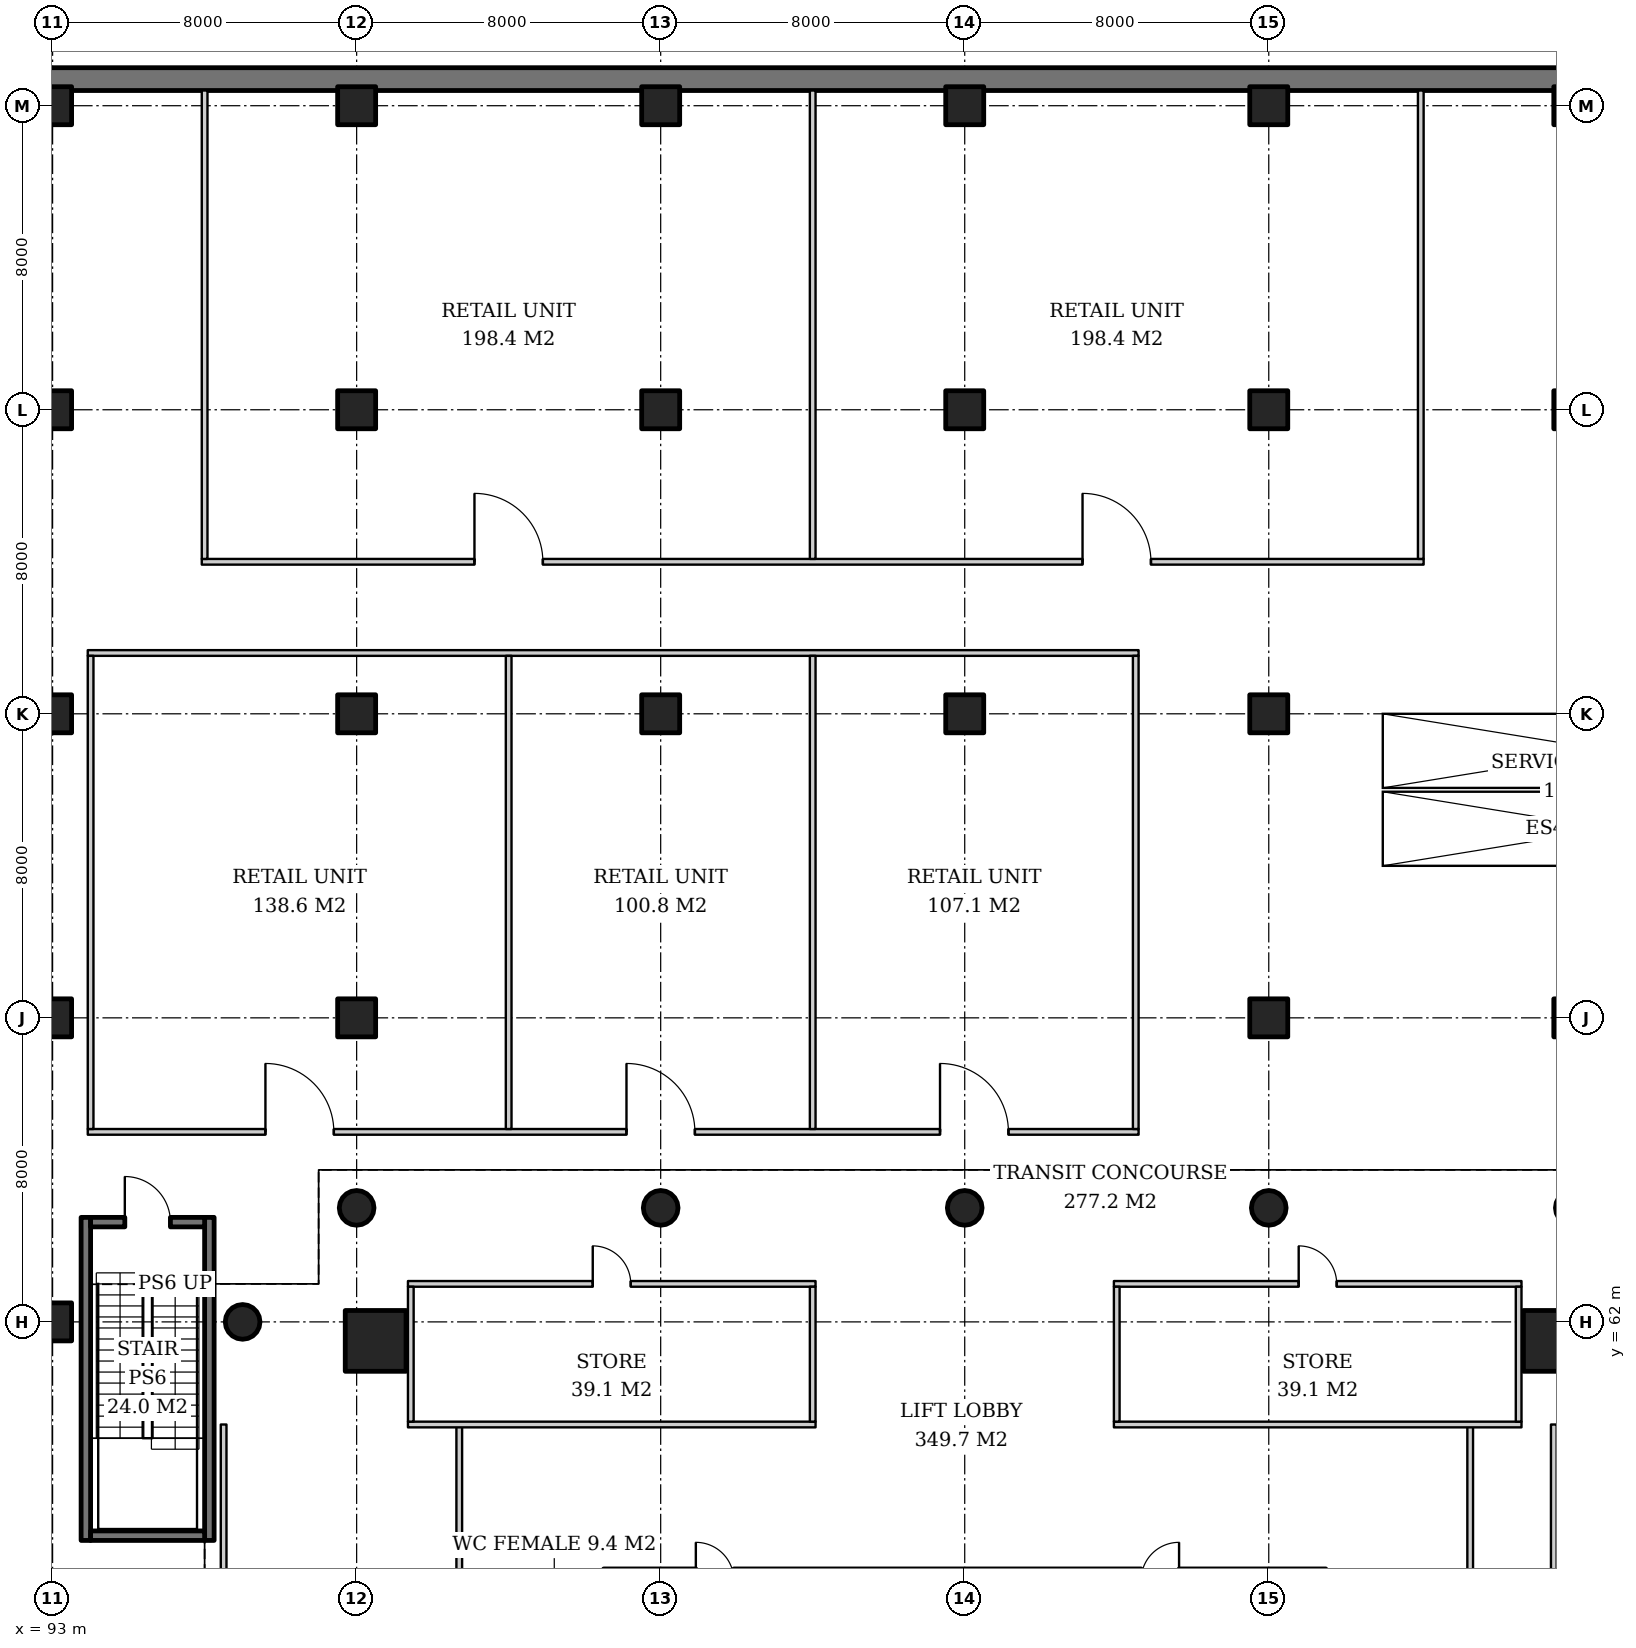
"""IFC4 building model, lengths in metres.
Left out: names, types, materials, properties, quantities, classifications, styles, units other than length and angle.
Written with IfcOpenShell. Run it as: python <this file> out.ifc"""

import sys

from ifc_helpers import new_model, si_unit, direction, frame, frame_2d, origin, origin_2d, place, context, subcontext, project, spatial, rectangle, hollow_circle, extrude, element, fill, save


model = new_model("IFC4")
c1 = context("Model", 3, precision=1e-05, world=origin(), true_north=direction((0.0, 1.0)))
c2 = subcontext(c1, "Body", "Model", "MODEL_VIEW")
j1 = project(units=[si_unit("LENGTHUNIT", "METRE"), si_unit("PLANEANGLEUNIT", "RADIAN")], contexts=[c1])
p1 = place(None, origin())
s1 = spatial("IfcSite", under=j1, at=p1, CompositionType="ELEMENT")
p2 = place(p1, origin())
s2 = spatial("IfcBuilding", under=s1, at=p2, CompositionType="ELEMENT")
p3 = place(p2, frame((0.0, 0.0, -5.0)))
s3 = spatial("IfcBuildingStorey", under=s2, at=p3, CompositionType="ELEMENT", Elevation=-5.0)
for number, where, z_axis, x_axis in (
    (1, (93.0, 62.0, 0.0), (0.0, 0.0, 1.0), (1.0, 0.0, 0.0)),
    (2, (93.0, 70.0, 0.0), (0.0, 0.0, 1.0), (1.0, 0.0, 0.0)),
    (3, (93.0, 78.0, 0.0), (0.0, 0.0, 1.0), (1.0, 0.0, 0.0)),
    (4, (93.0, 86.0, 0.0), (0.0, 0.0, 1.0), (1.0, 0.0, 0.0)),
    (5, (93.0, 94.0, 0.0), (0.0, 0.0, 1.0), (1.0, 0.0, 0.0)),
    (6, (101.0, 70.0, 0.0), (0.0, 0.0, 1.0), (1.0, 0.0, 0.0)),
    (7, (101.0, 78.0, 0.0), (0.0, 0.0, 1.0), (1.0, 0.0, 0.0)),
    (8, (101.0, 86.0, 0.0), (0.0, 0.0, 1.0), (1.0, 0.0, 0.0)),
    (9, (101.0, 94.0, 0.0), (0.0, 0.0, 1.0), (1.0, 0.0, 0.0)),
    (10, (109.0, 78.0, 0.0), (0.0, 0.0, 1.0), (1.0, 0.0, 0.0)),
    (11, (109.0, 86.0, 0.0), (0.0, 0.0, 1.0), (1.0, 0.0, 0.0)),
    (12, (109.0, 94.0, 0.0), (0.0, 0.0, 1.0), (1.0, 0.0, 0.0)),
    (13, (117.0, 78.0, 0.0), (0.0, 0.0, 1.0), (1.0, 0.0, 0.0)),
    (14, (117.0, 86.0, 0.0), (0.0, 0.0, 1.0), (1.0, 0.0, 0.0)),
    (15, (117.0, 94.0, 0.0), (0.0, 0.0, 1.0), (1.0, 0.0, 0.0)),
    (16, (125.0, 70.0, 0.0), (0.0, 0.0, 1.0), (1.0, 0.0, 0.0)),
    (17, (125.0, 78.0, 0.0), (0.0, 0.0, 1.0), (1.0, 0.0, 0.0)),
    (18, (125.0, 86.0, 0.0), (0.0, 0.0, 1.0), (1.0, 0.0, 0.0)),
    (19, (125.0, 94.0, 0.0), (0.0, 0.0, 1.0), (1.0, 0.0, 0.0)),
    (20, (133.0, 70.0, 0.0), (0.0, 0.0, 1.0), (1.0, 0.0, 0.0)),
    (21, (133.0, 86.0, 0.0), (0.0, 0.0, 1.0), (1.0, 0.0, 0.0)),
    (22, (133.0, 94.0, 0.0), (0.0, 0.0, 1.0), (1.0, 0.0, 0.0)),
):
    element("IfcColumn", number, at=place(p3, frame(where, z_axis=z_axis, x_axis=x_axis)), inside=s3, PredefinedType="COLUMN", context=c2, shape_type="SweptSolid", body=[
        extrude(rectangle(XDim=1.0, YDim=1.0, at=origin_2d()), origin(), (0.0, 0.0, 1.0), 5.0),
    ])
p4 = place(p3, frame((85.025, 94.7, 0.0), z_axis=(0.0, 0.0, 1.0), x_axis=(1.0, 0.0, 0.0)))
e23 = element("IfcWall", 23, at=p4, inside=s3, PredefinedType="USERDEFINED", context=c2, shape_type="SweptSolid", body=[
    extrude(rectangle(XDim=56.975, YDim=0.6, at=frame_2d((28.488, 0.0))), origin(), (0.0, 0.0, 1.0), 5.0),
])
for number, where, z_axis, x_axis in (
    (24, (132.5, 61.5, 0.0), (0.0, 0.0, 1.0), (1.0, 0.0, 0.0)),
    (25, (101.5, 61.5, 0.0), (0.0, 0.0, 1.0), (1.0, 0.0, 0.0)),
):
    element("IfcColumn", number, at=place(p3, frame(where, z_axis=z_axis, x_axis=x_axis)), inside=s3, PredefinedType="COLUMN", context=c2, shape_type="SweptSolid", body=[
        extrude(rectangle(XDim=1.6, YDim=1.6, at=origin_2d()), origin(), (0.0, 0.0, 1.0), 5.0),
    ])
for number, where, z_axis, x_axis in (
    (26, (133.0, 65.0, 0.0), (0.0, 0.0, 1.0), (1.0, 0.0, 0.0)),
    (27, (101.0, 65.0, 0.0), (0.0, 0.0, 1.0), (1.0, 0.0, 0.0)),
    (28, (125.0, 65.0, 0.0), (0.0, 0.0, 1.0), (1.0, 0.0, 0.0)),
    (29, (117.0, 65.0, 0.0), (0.0, 0.0, 1.0), (1.0, 0.0, 0.0)),
    (30, (109.0, 65.0, 0.0), (0.0, 0.0, 1.0), (1.0, 0.0, 0.0)),
    (31, (98.0, 62.0, 0.0), (0.0, 0.0, 1.0), (1.0, 0.0, 0.0)),
):
    element("IfcColumn", number, at=place(p3, frame(where, z_axis=z_axis, x_axis=x_axis)), inside=s3, PredefinedType="COLUMN", context=c2, shape_type="SweptSolid", body=[
        extrude(hollow_circle(Radius=0.457, WallThickness=0.03, at=origin_2d()), origin(), (0.0, 0.0, 1.0), 5.0),
    ])
for number, where, z_axis, x_axis in (
    (32, (93.875, 56.25, 0.0), (0.0, 0.0, 1.0), (0.0, 1.0, 0.0)),
    (33, (97.125, 56.25, 0.0), (0.0, 0.0, 1.0), (0.0, 1.0, 0.0)),
):
    element("IfcWall", number, at=place(p3, frame(where, z_axis=z_axis, x_axis=x_axis)), inside=s3, PredefinedType="SOLIDWALL", context=c2, shape_type="SweptSolid", body=[
        extrude(rectangle(XDim=8.5, YDim=0.25, at=frame_2d((4.25, 0.0))), origin(), (0.0, 0.0, 1.0), 4.6),
    ])
p5 = place(p3, frame((94.0, 56.375, 0.0), z_axis=(0.0, 0.0, 1.0), x_axis=(1.0, 0.0, 0.0)))
e34 = element("IfcWall", 34, at=p5, inside=s3, PredefinedType="SOLIDWALL", context=c2, shape_type="SweptSolid", body=[
    extrude(rectangle(XDim=3.0, YDim=0.25, at=frame_2d((1.5, 0.0))), origin(), (0.0, 0.0, 1.0), 4.6),
])
p6 = place(p3, frame((94.0, 64.625, 0.0), z_axis=(0.0, 0.0, 1.0), x_axis=(1.0, 0.0, 0.0)))
e35 = element("IfcWall", 35, at=p6, inside=s3, PredefinedType="SOLIDWALL", context=c2, shape_type="SweptSolid", body=[
    extrude(rectangle(XDim=3.0, YDim=0.25, at=frame_2d((1.5, 0.0))), origin(), (0.0, 0.0, 1.0), 4.6),
])
p7 = place(p6, frame((0.9, 0.0, 0.0)))
e36 = element("IfcOpeningElement", 36, at=p7, cuts=e35, PredefinedType="OPENING", context=c2, shape_type="SweptSolid", body=[
    extrude(rectangle(XDim=1.2, YDim=2.1, at=frame_2d((0.6, 1.05))), frame((0.0, 0.135, 0.0), z_axis=(0.0, -1.0, 0.0), x_axis=(1.0, 0.0, 0.0)), (0.0, 0.0, 1.0), 0.27),
])
p8 = place(p3, frame((96.925, 82.0, 0.0), z_axis=(0.0, 0.0, 1.0), x_axis=(1.0, 0.0, 0.0)))
e37 = element("IfcWall", 37, at=p8, inside=s3, PredefinedType="PARTITIONING", context=c2, shape_type="SweptSolid", body=[
    extrude(rectangle(XDim=32.15, YDim=0.15, at=frame_2d((16.075, 0.0))), origin(), (0.0, 0.0, 1.0), 4.6),
])
p9 = place(p8, frame((7.175, 0.0, 0.0)))
e38 = element("IfcOpeningElement", 38, at=p9, cuts=e37, PredefinedType="OPENING", context=c2, shape_type="SweptSolid", body=[
    extrude(rectangle(XDim=1.8, YDim=2.4, at=frame_2d((0.9, 1.2))), frame((0.0, 0.085, 0.0), z_axis=(0.0, -1.0, 0.0), x_axis=(1.0, 0.0, 0.0)), (0.0, 0.0, 1.0), 0.17),
])
p10 = place(p8, frame((23.175, 0.0, 0.0)))
e39 = element("IfcOpeningElement", 39, at=p10, cuts=e37, PredefinedType="OPENING", context=c2, shape_type="SweptSolid", body=[
    extrude(rectangle(XDim=1.8, YDim=2.4, at=frame_2d((0.9, 1.2))), frame((0.0, 0.085, 0.0), z_axis=(0.0, -1.0, 0.0), x_axis=(1.0, 0.0, 0.0)), (0.0, 0.0, 1.0), 0.17),
])
for number, where, z_axis, x_axis in (
    (40, (97.0, 82.075, 0.0), (0.0, 0.0, 1.0), (0.0, 1.0, 0.0)),
    (41, (113.0, 82.075, 0.0), (0.0, 0.0, 1.0), (0.0, 1.0, 0.0)),
    (42, (129.0, 82.075, 0.0), (0.0, 0.0, 1.0), (0.0, 1.0, 0.0)),
):
    element("IfcWall", number, at=place(p3, frame(where, z_axis=z_axis, x_axis=x_axis)), inside=s3, PredefinedType="PARTITIONING", context=c2, shape_type="SweptSolid", body=[
        extrude(rectangle(XDim=12.325, YDim=0.15, at=frame_2d((6.163, 0.0))), origin(), (0.0, 0.0, 1.0), 4.6),
    ])
p11 = place(p3, frame((97.5, 54.457, 0.0), z_axis=(0.0, 0.0, 1.0), x_axis=(0.0, 1.0, 0.0)))
e43 = element("IfcWall", 43, at=p11, inside=s3, PredefinedType="PARTITIONING", context=c2, shape_type="SweptSolid", body=[
    extrude(rectangle(XDim=4.843, YDim=0.15, at=frame_2d((2.421, 0.0))), origin(), (0.0, 0.0, 1.0), 4.7),
])
p12 = place(p3, frame((103.7, 32.7, 0.0), z_axis=(0.0, 0.0, 1.0), x_axis=(0.0, 1.0, 0.0)))
e44 = element("IfcWall", 44, at=p12, inside=s3, PredefinedType="PARTITIONING", context=c2, shape_type="SweptSolid", body=[
    extrude(rectangle(XDim=26.6, YDim=0.15, at=frame_2d((13.3, 0.0))), origin(), (0.0, 0.0, 1.0), 3.9),
])
p13 = place(p12, frame((5.75, 0.0, 0.0)))
e45 = element("IfcOpeningElement", 45, at=p13, cuts=e44, PredefinedType="OPENING", context=c2, shape_type="SweptSolid", body=[
    extrude(rectangle(XDim=1.8, YDim=2.4, at=frame_2d((0.9, 1.2))), frame((0.0, 0.085, 0.0), z_axis=(0.0, -1.0, 0.0), x_axis=(1.0, 0.0, 0.0)), (0.0, 0.0, 1.0), 0.17),
])
p14 = place(p12, frame((19.05, 0.0, 0.0)))
e46 = element("IfcOpeningElement", 46, at=p14, cuts=e44, PredefinedType="OPENING", context=c2, shape_type="SweptSolid", body=[
    extrude(rectangle(XDim=1.8, YDim=2.4, at=frame_2d((0.9, 1.2))), frame((0.0, 0.085, 0.0), z_axis=(0.0, -1.0, 0.0), x_axis=(1.0, 0.0, 0.0)), (0.0, 0.0, 1.0), 0.17),
])
p15 = place(p3, frame((130.3, 32.7, 0.0), z_axis=(0.0, 0.0, 1.0), x_axis=(0.0, 1.0, 0.0)))
e47 = element("IfcWall", 47, at=p15, inside=s3, PredefinedType="PARTITIONING", context=c2, shape_type="SweptSolid", body=[
    extrude(rectangle(XDim=26.6, YDim=0.15, at=frame_2d((13.3, 0.0))), origin(), (0.0, 0.0, 1.0), 3.9),
])
p16 = place(p15, frame((6.15, 0.0, 0.0)))
e48 = element("IfcOpeningElement", 48, at=p16, cuts=e47, PredefinedType="OPENING", context=c2, shape_type="SweptSolid", body=[
    extrude(rectangle(XDim=1.0, YDim=2.1, at=frame_2d((0.5, 1.05))), frame((0.0, 0.085, 0.0), z_axis=(0.0, -1.0, 0.0), x_axis=(1.0, 0.0, 0.0)), (0.0, 0.0, 1.0), 0.17),
])
p17 = place(p15, frame((19.45, 0.0, 0.0)))
e49 = element("IfcOpeningElement", 49, at=p17, cuts=e47, PredefinedType="OPENING", context=c2, shape_type="SweptSolid", body=[
    extrude(rectangle(XDim=1.0, YDim=2.1, at=frame_2d((0.5, 1.05))), frame((0.0, 0.085, 0.0), z_axis=(0.0, -1.0, 0.0), x_axis=(1.0, 0.0, 0.0)), (0.0, 0.0, 1.0), 0.17),
])
p18 = place(p3, frame((132.5, 32.7, 0.0), z_axis=(0.0, 0.0, 1.0), x_axis=(0.0, 1.0, 0.0)))
e50 = element("IfcWall", 50, at=p18, inside=s3, PredefinedType="PARTITIONING", context=c2, shape_type="SweptSolid", body=[
    extrude(rectangle(XDim=26.6, YDim=0.15, at=frame_2d((13.3, 0.0))), origin(), (0.0, 0.0, 1.0), 3.9),
])
p19 = place(p3, frame((102.35, 59.3, 0.0), z_axis=(0.0, 0.0, 1.0), x_axis=(1.0, 0.0, 0.0)))
e51 = element("IfcWall", 51, at=p19, inside=s3, PredefinedType="PARTITIONING", context=c2, shape_type="SweptSolid", body=[
    extrude(rectangle(XDim=10.725, YDim=0.15, at=frame_2d((5.362, 0.0))), origin(), (0.0, 0.0, 1.0), 3.947),
])
p20 = place(p3, frame((102.35, 63.0, 0.0), z_axis=(0.0, 0.0, 1.0), x_axis=(1.0, 0.0, 0.0)))
e52 = element("IfcWall", 52, at=p20, inside=s3, PredefinedType="PARTITIONING", context=c2, shape_type="SweptSolid", body=[
    extrude(rectangle(XDim=10.725, YDim=0.15, at=frame_2d((5.362, 0.0))), origin(), (0.0, 0.0, 1.0), 3.947),
])
p21 = place(p20, frame((4.863, 0.0, 0.0)))
e53 = element("IfcOpeningElement", 53, at=p21, cuts=e52, PredefinedType="OPENING", context=c2, shape_type="SweptSolid", body=[
    extrude(rectangle(XDim=1.0, YDim=2.1, at=frame_2d((0.5, 1.05))), frame((0.0, 0.085, 0.0), z_axis=(0.0, -1.0, 0.0), x_axis=(1.0, 0.0, 0.0)), (0.0, 0.0, 1.0), 0.17),
])
for number, where, z_axis, x_axis in (
    (54, (102.425, 59.375, 0.0), (0.0, 0.0, 1.0), (0.0, 1.0, 0.0)),
    (55, (113.0, 59.375, 0.0), (0.0, 0.0, 1.0), (0.0, 1.0, 0.0)),
):
    element("IfcWall", number, at=place(p3, frame(where, z_axis=z_axis, x_axis=x_axis)), inside=s3, PredefinedType="PARTITIONING", context=c2, shape_type="SweptSolid", body=[
        extrude(rectangle(XDim=3.55, YDim=0.15, at=frame_2d((1.775, 0.0))), origin(), (0.0, 0.0, 1.0), 4.7),
    ])
p22 = place(p3, frame((120.925, 59.3, 0.0), z_axis=(0.0, 0.0, 1.0), x_axis=(1.0, 0.0, 0.0)))
e56 = element("IfcWall", 56, at=p22, inside=s3, PredefinedType="PARTITIONING", context=c2, shape_type="SweptSolid", body=[
    extrude(rectangle(XDim=10.725, YDim=0.15, at=frame_2d((5.362, 0.0))), origin(), (0.0, 0.0, 1.0), 3.9),
])
p23 = place(p3, frame((120.925, 63.0, 0.0), z_axis=(0.0, 0.0, 1.0), x_axis=(1.0, 0.0, 0.0)))
e57 = element("IfcWall", 57, at=p23, inside=s3, PredefinedType="PARTITIONING", context=c2, shape_type="SweptSolid", body=[
    extrude(rectangle(XDim=10.725, YDim=0.15, at=frame_2d((5.362, 0.0))), origin(), (0.0, 0.0, 1.0), 3.9),
])
p24 = place(p23, frame((4.863, 0.0, 0.0)))
e58 = element("IfcOpeningElement", 58, at=p24, cuts=e57, PredefinedType="OPENING", context=c2, shape_type="SweptSolid", body=[
    extrude(rectangle(XDim=1.0, YDim=2.1, at=frame_2d((0.5, 1.05))), frame((0.0, 0.085, 0.0), z_axis=(0.0, -1.0, 0.0), x_axis=(1.0, 0.0, 0.0)), (0.0, 0.0, 1.0), 0.17),
])
for number, where, z_axis, x_axis in (
    (59, (121.0, 59.375, 0.0), (0.0, 0.0, 1.0), (0.0, 1.0, 0.0)),
    (60, (131.575, 59.375, 0.0), (0.0, 0.0, 1.0), (0.0, 1.0, 0.0)),
):
    element("IfcWall", number, at=place(p3, frame(where, z_axis=z_axis, x_axis=x_axis)), inside=s3, PredefinedType="PARTITIONING", context=c2, shape_type="SweptSolid", body=[
        extrude(rectangle(XDim=3.55, YDim=0.15, at=frame_2d((1.775, 0.0))), origin(), (0.0, 0.0, 1.0), 4.7),
    ])
p25 = place(p3, frame((93.925, 67.0, 0.0), z_axis=(0.0, 0.0, 1.0), x_axis=(1.0, 0.0, 0.0)))
e61 = element("IfcWall", 61, at=p25, inside=s3, PredefinedType="PARTITIONING", context=c2, shape_type="SweptSolid", body=[
    extrude(rectangle(XDim=27.65, YDim=0.15, at=frame_2d((13.825, 0.0))), origin(), (0.0, 0.0, 1.0), 4.6),
])
p26 = place(p25, frame((4.675, 0.0, 0.0)))
e62 = element("IfcOpeningElement", 62, at=p26, cuts=e61, PredefinedType="OPENING", context=c2, shape_type="SweptSolid", body=[
    extrude(rectangle(XDim=1.8, YDim=2.4, at=frame_2d((0.9, 1.2))), frame((0.0, 0.085, 0.0), z_axis=(0.0, -1.0, 0.0), x_axis=(1.0, 0.0, 0.0)), (0.0, 0.0, 1.0), 0.17),
])
p27 = place(p25, frame((14.175, 0.0, 0.0)))
e63 = element("IfcOpeningElement", 63, at=p27, cuts=e61, PredefinedType="OPENING", context=c2, shape_type="SweptSolid", body=[
    extrude(rectangle(XDim=1.8, YDim=2.4, at=frame_2d((0.9, 1.2))), frame((0.0, 0.085, 0.0), z_axis=(0.0, -1.0, 0.0), x_axis=(1.0, 0.0, 0.0)), (0.0, 0.0, 1.0), 0.17),
])
p28 = place(p25, frame((22.425, 0.0, 0.0)))
e64 = element("IfcOpeningElement", 64, at=p28, cuts=e61, PredefinedType="OPENING", context=c2, shape_type="SweptSolid", body=[
    extrude(rectangle(XDim=1.8, YDim=2.4, at=frame_2d((0.9, 1.2))), frame((0.0, 0.085, 0.0), z_axis=(0.0, -1.0, 0.0), x_axis=(1.0, 0.0, 0.0)), (0.0, 0.0, 1.0), 0.17),
])
p29 = place(p3, frame((93.925, 79.6, 0.0), z_axis=(0.0, 0.0, 1.0), x_axis=(1.0, 0.0, 0.0)))
e65 = element("IfcWall", 65, at=p29, inside=s3, PredefinedType="PARTITIONING", context=c2, shape_type="SweptSolid", body=[
    extrude(rectangle(XDim=27.65, YDim=0.15, at=frame_2d((13.825, 0.0))), origin(), (0.0, 0.0, 1.0), 4.6),
])
for number, where, z_axis, x_axis in (
    (66, (94.0, 67.075, 0.0), (0.0, 0.0, 1.0), (0.0, 1.0, 0.0)),
    (67, (121.5, 67.075, 0.0), (0.0, 0.0, 1.0), (0.0, 1.0, 0.0)),
    (68, (105.0, 67.075, 0.0), (0.0, 0.0, 1.0), (0.0, 1.0, 0.0)),
    (69, (113.0, 67.075, 0.0), (0.0, 0.0, 1.0), (0.0, 1.0, 0.0)),
):
    element("IfcWall", number, at=place(p3, frame(where, z_axis=z_axis, x_axis=x_axis)), inside=s3, PredefinedType="PARTITIONING", context=c2, shape_type="SweptSolid", body=[
        extrude(rectangle(XDim=12.45, YDim=0.15, at=frame_2d((6.225, 0.0))), origin(), (0.0, 0.0, 1.0), 4.6),
    ])
p30 = place(p7, origin())
e70 = element("IfcDoor", 70, at=p30, inside=s3, OperationType="SINGLE_SWING_LEFT", PredefinedType="DOOR", context=c2, shape_type="SweptSolid", body=[
    extrude(rectangle(XDim=1.2, YDim=2.1, at=frame_2d((0.6, 1.05))), frame((0.0, 0.025, 0.0), z_axis=(0.0, -1.0, 0.0), x_axis=(1.0, 0.0, 0.0)), (0.0, 0.0, 1.0), 0.05),
])
fill(e36, e70)
p31 = place(p9, origin())
e71 = element("IfcDoor", 71, at=p31, inside=s3, OperationType="DOUBLE_DOOR_SINGLE_SWING", PredefinedType="DOOR", context=c2, shape_type="SweptSolid", body=[
    extrude(rectangle(XDim=1.8, YDim=2.4, at=frame_2d((0.9, 1.2))), frame((0.0, 0.025, 0.0), z_axis=(0.0, -1.0, 0.0), x_axis=(1.0, 0.0, 0.0)), (0.0, 0.0, 1.0), 0.05),
])
fill(e38, e71)
p32 = place(p10, origin())
e72 = element("IfcDoor", 72, at=p32, inside=s3, OperationType="DOUBLE_DOOR_SINGLE_SWING", PredefinedType="DOOR", context=c2, shape_type="SweptSolid", body=[
    extrude(rectangle(XDim=1.8, YDim=2.4, at=frame_2d((0.9, 1.2))), frame((0.0, 0.025, 0.0), z_axis=(0.0, -1.0, 0.0), x_axis=(1.0, 0.0, 0.0)), (0.0, 0.0, 1.0), 0.05),
])
fill(e39, e72)
p33 = place(p21, origin())
e73 = element("IfcDoor", 73, at=p33, inside=s3, OperationType="SINGLE_SWING_LEFT", PredefinedType="DOOR", context=c2, shape_type="SweptSolid", body=[
    extrude(rectangle(XDim=1.0, YDim=2.1, at=frame_2d((0.5, 1.05))), frame((0.0, 0.025, 0.0), z_axis=(0.0, -1.0, 0.0), x_axis=(1.0, 0.0, 0.0)), (0.0, 0.0, 1.0), 0.05),
])
fill(e53, e73)
p34 = place(p24, origin())
e74 = element("IfcDoor", 74, at=p34, inside=s3, OperationType="SINGLE_SWING_LEFT", PredefinedType="DOOR", context=c2, shape_type="SweptSolid", body=[
    extrude(rectangle(XDim=1.0, YDim=2.1, at=frame_2d((0.5, 1.05))), frame((0.0, 0.025, 0.0), z_axis=(0.0, -1.0, 0.0), x_axis=(1.0, 0.0, 0.0)), (0.0, 0.0, 1.0), 0.05),
])
fill(e58, e74)
p35 = place(p26, origin())
e75 = element("IfcDoor", 75, at=p35, inside=s3, OperationType="DOUBLE_DOOR_SINGLE_SWING", PredefinedType="DOOR", context=c2, shape_type="SweptSolid", body=[
    extrude(rectangle(XDim=1.8, YDim=2.4, at=frame_2d((0.9, 1.2))), frame((0.0, 0.025, 0.0), z_axis=(0.0, -1.0, 0.0), x_axis=(1.0, 0.0, 0.0)), (0.0, 0.0, 1.0), 0.05),
])
fill(e62, e75)
p36 = place(p27, origin())
e76 = element("IfcDoor", 76, at=p36, inside=s3, OperationType="DOUBLE_DOOR_SINGLE_SWING", PredefinedType="DOOR", context=c2, shape_type="SweptSolid", body=[
    extrude(rectangle(XDim=1.8, YDim=2.4, at=frame_2d((0.9, 1.2))), frame((0.0, 0.025, 0.0), z_axis=(0.0, -1.0, 0.0), x_axis=(1.0, 0.0, 0.0)), (0.0, 0.0, 1.0), 0.05),
])
fill(e63, e76)
p37 = place(p28, origin())
e77 = element("IfcDoor", 77, at=p37, inside=s3, OperationType="DOUBLE_DOOR_SINGLE_SWING", PredefinedType="DOOR", context=c2, shape_type="SweptSolid", body=[
    extrude(rectangle(XDim=1.8, YDim=2.4, at=frame_2d((0.9, 1.2))), frame((0.0, 0.025, 0.0), z_axis=(0.0, -1.0, 0.0), x_axis=(1.0, 0.0, 0.0)), (0.0, 0.0, 1.0), 0.05),
])
fill(e64, e77)
save(model, sys.argv[1])
